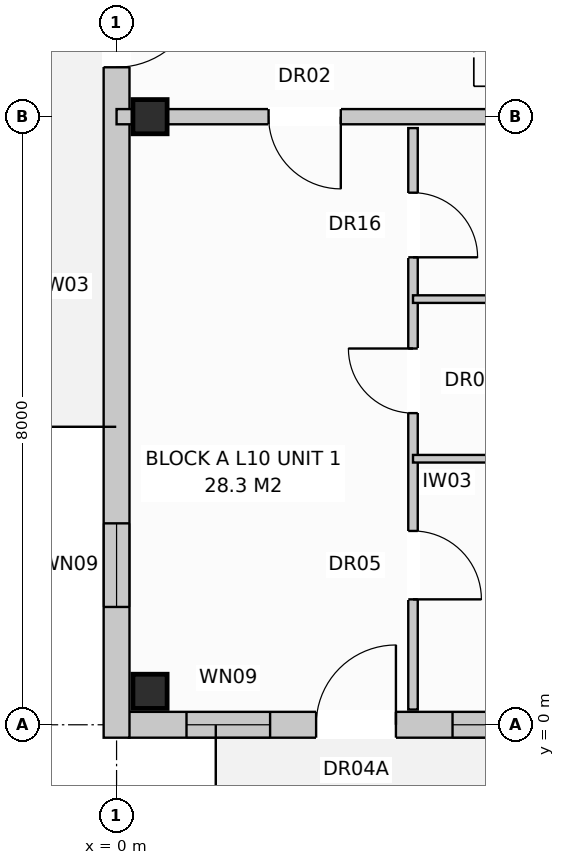
"""IFC4 building model, lengths in metres.
Left out: names, types, materials, properties, quantities, classifications, styles, units other than length and angle.
Written with IfcOpenShell. Run it as: python <this file> out.ifc"""

import sys

from ifc_helpers import new_model, si_unit, direction, frame, frame_2d, origin, origin_with_axes, origin_2d, place, context, subcontext, project, spatial, rectangle, extrude, element, fill, save


model = new_model("IFC4")
c1 = context("Model", 3, precision=1e-05, world=origin(), true_north=direction((0.0, 1.0)))
c2 = subcontext(c1, "Body", "Model", "MODEL_VIEW")
j1 = project(units=[si_unit("LENGTHUNIT", "METRE"), si_unit("PLANEANGLEUNIT", "RADIAN")], contexts=[c1])
p1 = place(None, origin())
s1 = spatial("IfcSite", under=j1, at=p1, CompositionType="ELEMENT")
p2 = place(p1, origin())
s2 = spatial("IfcBuilding", under=s1, at=p2, CompositionType="ELEMENT")
p3 = place(p2, frame((0.0, 0.0, 33.6)))
s3 = spatial("IfcBuildingStorey", under=s2, at=p3, CompositionType="ELEMENT", Elevation=33.6)
for number, where, z_axis, x_axis in (
    (1, (0.44, 0.44, 0.0), (0.0, 0.0, 1.0), (1.0, 0.0, 0.0)),
    (2, (0.44, 8.0, 0.0), (0.0, 0.0, 1.0), (1.0, 0.0, 0.0)),
):
    element("IfcColumn", number, at=place(p3, frame(where, z_axis=z_axis, x_axis=x_axis)), inside=s3, PredefinedType="COLUMN", context=c2, shape_type="SweptSolid", body=[
        extrude(rectangle(XDim=0.45, YDim=0.45, at=origin_2d()), origin(), (0.0, 0.0, 1.0), 3.2),
    ])
p4 = place(p3, frame((0.16, 0.0, 0.0), z_axis=(0.0, 0.0, 1.0), x_axis=(1.0, 0.0, 0.0)))
e3 = element("IfcWall", 3, at=p4, inside=s3, PredefinedType="STANDARD", context=c2, shape_type="SweptSolid", body=[
    extrude(rectangle(XDim=41.08, YDim=0.34, at=frame_2d((20.54, 0.0))), origin(), (0.0, 0.0, 1.0), 2.96),
])
p5 = place(p4, frame((2.465, 0.0, 0.0)))
e4 = element("IfcOpeningElement", 4, at=p5, cuts=e3, PredefinedType="OPENING", context=c2, shape_type="SweptSolid", body=[
    extrude(rectangle(XDim=1.05, YDim=2.12, at=frame_2d((0.525, 1.06))), frame((0.0, 0.182, 0.0), z_axis=(0.0, -1.0, 0.0), x_axis=(1.0, 0.0, 0.0)), (0.0, 0.0, 1.0), 0.364),
])
p6 = place(p4, frame((18.86, 0.0, 0.0)))
e5 = element("IfcOpeningElement", 5, at=p6, cuts=e3, PredefinedType="OPENING", context=c2, shape_type="SweptSolid", body=[
    extrude(rectangle(XDim=1.05, YDim=2.12, at=frame_2d((0.525, 1.06))), frame((0.0, 0.182, 0.0), z_axis=(0.0, -1.0, 0.0), x_axis=(1.0, 0.0, 0.0)), (0.0, 0.0, 1.0), 0.364),
])
p7 = place(p4, frame((32.66, 0.0, 0.0)))
e6 = element("IfcOpeningElement", 6, at=p7, cuts=e3, PredefinedType="OPENING", context=c2, shape_type="SweptSolid", body=[
    extrude(rectangle(XDim=1.05, YDim=2.12, at=frame_2d((0.525, 1.06))), frame((0.0, 0.182, 0.0), z_axis=(0.0, -1.0, 0.0), x_axis=(1.0, 0.0, 0.0)), (0.0, 0.0, 1.0), 0.364),
])
p8 = place(p4, frame((0.76, 0.0, 0.72)))
e7 = element("IfcOpeningElement", 7, at=p8, cuts=e3, PredefinedType="OPENING", context=c2, shape_type="SweptSolid", body=[
    extrude(rectangle(XDim=1.1, YDim=1.5, at=frame_2d((0.55, 0.75))), frame((0.0, 0.182, 0.0), z_axis=(0.0, -1.0, 0.0), x_axis=(1.0, 0.0, 0.0)), (0.0, 0.0, 1.0), 0.364),
])
p9 = place(p4, frame((4.26, 0.0, 0.72)))
e8 = element("IfcOpeningElement", 8, at=p9, cuts=e3, PredefinedType="OPENING", context=c2, shape_type="SweptSolid", body=[
    extrude(rectangle(XDim=1.9, YDim=1.85, at=frame_2d((0.95, 0.925))), frame((0.0, 0.182, 0.0), z_axis=(0.0, -1.0, 0.0), x_axis=(1.0, 0.0, 0.0)), (0.0, 0.0, 1.0), 0.364),
])
p10 = place(p4, frame((7.935, 0.0, 0.8)))
e9 = element("IfcOpeningElement", 9, at=p10, cuts=e3, PredefinedType="OPENING", context=c2, shape_type="SweptSolid", body=[
    extrude(rectangle(XDim=1.95, YDim=1.65, at=frame_2d((0.975, 0.825))), frame((0.0, 0.182, 0.0), z_axis=(0.0, -1.0, 0.0), x_axis=(1.0, 0.0, 0.0)), (0.0, 0.0, 1.0), 0.364),
])
p11 = place(p4, frame((11.66, 0.0, 0.72)))
e10 = element("IfcOpeningElement", 10, at=p11, cuts=e3, PredefinedType="OPENING", context=c2, shape_type="SweptSolid", body=[
    extrude(rectangle(XDim=1.1, YDim=1.5, at=frame_2d((0.55, 0.75))), frame((0.0, 0.182, 0.0), z_axis=(0.0, -1.0, 0.0), x_axis=(1.0, 0.0, 0.0)), (0.0, 0.0, 1.0), 0.364),
])
p12 = place(p4, frame((16.735, 0.0, 0.8)))
e11 = element("IfcOpeningElement", 11, at=p12, cuts=e3, PredefinedType="OPENING", context=c2, shape_type="SweptSolid", body=[
    extrude(rectangle(XDim=1.9, YDim=1.85, at=frame_2d((0.95, 0.925))), frame((0.0, 0.182, 0.0), z_axis=(0.0, -1.0, 0.0), x_axis=(1.0, 0.0, 0.0)), (0.0, 0.0, 1.0), 0.364),
])
p13 = place(p4, frame((22.235, 0.0, 0.8)))
e12 = element("IfcOpeningElement", 12, at=p13, cuts=e3, PredefinedType="OPENING", context=c2, shape_type="SweptSolid", body=[
    extrude(rectangle(XDim=1.95, YDim=1.65, at=frame_2d((0.975, 0.825))), frame((0.0, 0.182, 0.0), z_axis=(0.0, -1.0, 0.0), x_axis=(1.0, 0.0, 0.0)), (0.0, 0.0, 1.0), 0.364),
])
p14 = place(p4, frame((28.36, 0.0, 0.72)))
e13 = element("IfcOpeningElement", 13, at=p14, cuts=e3, PredefinedType="OPENING", context=c2, shape_type="SweptSolid", body=[
    extrude(rectangle(XDim=1.1, YDim=1.5, at=frame_2d((0.55, 0.75))), frame((0.0, 0.182, 0.0), z_axis=(0.0, -1.0, 0.0), x_axis=(1.0, 0.0, 0.0)), (0.0, 0.0, 1.0), 0.364),
])
p15 = place(p4, frame((30.46, 0.0, 0.8)))
e14 = element("IfcOpeningElement", 14, at=p15, cuts=e3, PredefinedType="OPENING", context=c2, shape_type="SweptSolid", body=[
    extrude(rectangle(XDim=1.9, YDim=1.85, at=frame_2d((0.95, 0.925))), frame((0.0, 0.182, 0.0), z_axis=(0.0, -1.0, 0.0), x_axis=(1.0, 0.0, 0.0)), (0.0, 0.0, 1.0), 0.364),
])
p16 = place(p4, frame((35.535, 0.0, 0.8)))
e15 = element("IfcOpeningElement", 15, at=p16, cuts=e3, PredefinedType="OPENING", context=c2, shape_type="SweptSolid", body=[
    extrude(rectangle(XDim=1.95, YDim=1.65, at=frame_2d((0.975, 0.825))), frame((0.0, 0.182, 0.0), z_axis=(0.0, -1.0, 0.0), x_axis=(1.0, 0.0, 0.0)), (0.0, 0.0, 1.0), 0.364),
])
p17 = place(p4, frame((39.26, 0.0, 0.72)))
e16 = element("IfcOpeningElement", 16, at=p17, cuts=e3, PredefinedType="OPENING", context=c2, shape_type="SweptSolid", body=[
    extrude(rectangle(XDim=1.1, YDim=1.5, at=frame_2d((0.55, 0.75))), frame((0.0, 0.182, 0.0), z_axis=(0.0, -1.0, 0.0), x_axis=(1.0, 0.0, 0.0)), (0.0, 0.0, 1.0), 0.364),
])
p18 = place(p3, frame((0.0, -0.17, 0.0), z_axis=(0.0, 0.0, 1.0), x_axis=(0.0, 1.0, 0.0)))
e17 = element("IfcWall", 17, at=p18, inside=s3, PredefinedType="STANDARD", context=c2, shape_type="SweptSolid", body=[
    extrude(rectangle(XDim=18.74, YDim=0.34, at=frame_2d((9.37, 0.0))), origin(), (0.0, 0.0, 1.0), 2.96),
])
p19 = place(p18, frame((8.82, 0.0, 0.0)))
e18 = element("IfcOpeningElement", 18, at=p19, cuts=e17, PredefinedType="OPENING", context=c2, shape_type="SweptSolid", body=[
    extrude(rectangle(XDim=1.1, YDim=2.1, at=frame_2d((0.55, 1.05))), frame((0.0, 0.182, 0.0), z_axis=(0.0, -1.0, 0.0), x_axis=(1.0, 0.0, 0.0)), (0.0, 0.0, 1.0), 0.364),
])
p20 = place(p18, frame((1.72, 0.0, 0.72)))
e19 = element("IfcOpeningElement", 19, at=p20, cuts=e17, PredefinedType="OPENING", context=c2, shape_type="SweptSolid", body=[
    extrude(rectangle(XDim=1.1, YDim=1.5, at=frame_2d((0.55, 0.75))), frame((0.0, 0.182, 0.0), z_axis=(0.0, -1.0, 0.0), x_axis=(1.0, 0.0, 0.0)), (0.0, 0.0, 1.0), 0.364),
])
p21 = place(p18, frame((15.92, 0.0, 0.72)))
e20 = element("IfcOpeningElement", 20, at=p21, cuts=e17, PredefinedType="OPENING", context=c2, shape_type="SweptSolid", body=[
    extrude(rectangle(XDim=1.1, YDim=1.5, at=frame_2d((0.55, 0.75))), frame((0.0, 0.182, 0.0), z_axis=(0.0, -1.0, 0.0), x_axis=(1.0, 0.0, 0.0)), (0.0, 0.0, 1.0), 0.364),
])
p22 = place(p3, frame((0.0, 8.0, 0.0), z_axis=(0.0, 0.0, 1.0), x_axis=(1.0, 0.0, 0.0)))
e21 = element("IfcWall", 21, at=p22, inside=s3, PredefinedType="PARTITIONING", context=c2, shape_type="SweptSolid", body=[
    extrude(rectangle(XDim=6.9, YDim=0.2, at=frame_2d((3.45, 0.0))), origin(), (0.0, 0.0, 1.0), 2.4),
])
p23 = place(p22, frame((2.0, 0.0, 0.0)))
e22 = element("IfcOpeningElement", 22, at=p23, cuts=e21, PredefinedType="OPENING", context=c2, shape_type="SweptSolid", body=[
    extrude(rectangle(XDim=0.95, YDim=2.15, at=frame_2d((0.475, 1.075))), frame((0.0, 0.112, 0.0), z_axis=(0.0, -1.0, 0.0), x_axis=(1.0, 0.0, 0.0)), (0.0, 0.0, 1.0), 0.224),
])
p24 = place(p3, frame((3.9, 7.85, 0.0), z_axis=(0.0, 0.0, 1.0), x_axis=(0.0, -1.0, 0.0)))
e23 = element("IfcWall", 23, at=p24, inside=s3, PredefinedType="PARTITIONING", context=c2, shape_type="SweptSolid", body=[
    extrude(rectangle(XDim=7.65, YDim=0.125, at=frame_2d((3.825, 0.0))), origin(), (0.0, 0.0, 1.0), 2.96),
])
p25 = place(p24, frame((0.85, 0.0, 0.0)))
e24 = element("IfcOpeningElement", 24, at=p25, cuts=e23, PredefinedType="OPENING", context=c2, shape_type="SweptSolid", body=[
    extrude(rectangle(XDim=0.85, YDim=2.1, at=frame_2d((0.425, 1.05))), frame((0.0, 0.074, 0.0), z_axis=(0.0, -1.0, 0.0), x_axis=(1.0, 0.0, 0.0)), (0.0, 0.0, 1.0), 0.149),
])
p26 = place(p24, frame((2.9, 0.0, 0.0)))
e25 = element("IfcOpeningElement", 25, at=p26, cuts=e23, PredefinedType="OPENING", context=c2, shape_type="SweptSolid", body=[
    extrude(rectangle(XDim=0.85, YDim=2.05, at=frame_2d((0.425, 1.025))), frame((0.0, 0.074, 0.0), z_axis=(0.0, -1.0, 0.0), x_axis=(1.0, 0.0, 0.0)), (0.0, 0.0, 1.0), 0.149),
])
p27 = place(p24, frame((5.3, 0.0, 0.0)))
e26 = element("IfcOpeningElement", 26, at=p27, cuts=e23, PredefinedType="OPENING", context=c2, shape_type="SweptSolid", body=[
    extrude(rectangle(XDim=0.9, YDim=2.1, at=frame_2d((0.45, 1.05))), frame((0.0, 0.074, 0.0), z_axis=(0.0, -1.0, 0.0), x_axis=(1.0, 0.0, 0.0)), (0.0, 0.0, 1.0), 0.149),
])
for number, where, z_axis, x_axis in (
    (27, (3.9, 5.6, 0.0), (0.0, 0.0, 1.0), (1.0, 0.0, 0.0)),
    (28, (3.9, 3.5, 0.0), (0.0, 0.0, 1.0), (1.0, 0.0, 0.0)),
):
    element("IfcWall", number, at=place(p3, frame(where, z_axis=z_axis, x_axis=x_axis)), inside=s3, PredefinedType="PARTITIONING", context=c2, shape_type="SweptSolid", body=[
        extrude(rectangle(XDim=2.9, YDim=0.1, at=frame_2d((1.45, 0.0))), origin(), (0.0, 0.0, 1.0), 2.96),
    ])
p28 = place(p5, origin_with_axes())
e29 = element("IfcDoor", 29, at=p28, inside=s3, OperationType="SINGLE_SWING_RIGHT", PredefinedType="DOOR", context=c2, shape_type="SweptSolid", body=[
    extrude(rectangle(XDim=1.05, YDim=2.12, at=frame_2d((0.525, 1.06))), frame((0.0, 0.025, 0.0), z_axis=(0.0, -1.0, 0.0), x_axis=(1.0, 0.0, 0.0)), (0.0, 0.0, 1.0), 0.05),
])
fill(e4, e29)
p29 = place(p8, origin_with_axes())
e30 = element("IfcWindow", 30, at=p29, inside=s3, PartitioningType="SINGLE_PANEL", PredefinedType="WINDOW", context=c2, shape_type="SweptSolid", body=[
    extrude(rectangle(XDim=1.1, YDim=1.5, at=frame_2d((0.55, 0.75))), frame((0.0, 0.03, 0.0), z_axis=(0.0, -1.0, 0.0), x_axis=(1.0, 0.0, 0.0)), (0.0, 0.0, 1.0), 0.06),
])
fill(e7, e30)
p30 = place(p9, origin_with_axes())
e31 = element("IfcWindow", 31, at=p30, inside=s3, PartitioningType="SINGLE_PANEL", PredefinedType="WINDOW", context=c2, shape_type="SweptSolid", body=[
    extrude(rectangle(XDim=1.9, YDim=1.85, at=frame_2d((0.95, 0.925))), frame((0.0, 0.03, 0.0), z_axis=(0.0, -1.0, 0.0), x_axis=(1.0, 0.0, 0.0)), (0.0, 0.0, 1.0), 0.06),
])
fill(e8, e31)
p31 = place(p19, frame((1.1, 0.0, 0.0), z_axis=(0.0, 0.0, 1.0), x_axis=(-1.0, 0.0, 0.0)))
e32 = element("IfcDoor", 32, at=p31, inside=s3, OperationType="SINGLE_SWING_RIGHT", PredefinedType="DOOR", context=c2, shape_type="SweptSolid", body=[
    extrude(rectangle(XDim=1.1, YDim=2.1, at=frame_2d((0.55, 1.05))), frame((0.0, 0.025, 0.0), z_axis=(0.0, -1.0, 0.0), x_axis=(1.0, 0.0, 0.0)), (0.0, 0.0, 1.0), 0.05),
])
fill(e18, e32)
p32 = place(p20, origin_with_axes())
e33 = element("IfcWindow", 33, at=p32, inside=s3, PartitioningType="SINGLE_PANEL", PredefinedType="WINDOW", context=c2, shape_type="SweptSolid", body=[
    extrude(rectangle(XDim=1.1, YDim=1.5, at=frame_2d((0.55, 0.75))), frame((0.0, 0.03, 0.0), z_axis=(0.0, -1.0, 0.0), x_axis=(1.0, 0.0, 0.0)), (0.0, 0.0, 1.0), 0.06),
])
fill(e19, e33)
p33 = place(p23, frame((0.95, 0.0, 0.0), z_axis=(0.0, 0.0, 1.0), x_axis=(-1.0, 0.0, 0.0)))
e34 = element("IfcDoor", 34, at=p33, inside=s3, OperationType="SINGLE_SWING_RIGHT", PredefinedType="DOOR", context=c2, shape_type="SweptSolid", body=[
    extrude(rectangle(XDim=0.95, YDim=2.15, at=frame_2d((0.475, 1.075))), frame((0.0, 0.025, 0.0), z_axis=(0.0, -1.0, 0.0), x_axis=(1.0, 0.0, 0.0)), (0.0, 0.0, 1.0), 0.05),
])
fill(e22, e34)
p34 = place(p25, origin_with_axes())
e35 = element("IfcDoor", 35, at=p34, inside=s3, OperationType="SINGLE_SWING_RIGHT", PredefinedType="DOOR", context=c2, shape_type="SweptSolid", body=[
    extrude(rectangle(XDim=0.85, YDim=2.1, at=frame_2d((0.425, 1.05))), frame((0.0, 0.025, 0.0), z_axis=(0.0, -1.0, 0.0), x_axis=(1.0, 0.0, 0.0)), (0.0, 0.0, 1.0), 0.05),
])
fill(e24, e35)
p35 = place(p26, frame((0.85, 0.0, 0.0), z_axis=(0.0, 0.0, 1.0), x_axis=(-1.0, 0.0, 0.0)))
e36 = element("IfcDoor", 36, at=p35, inside=s3, OperationType="SINGLE_SWING_LEFT", PredefinedType="DOOR", context=c2, shape_type="SweptSolid", body=[
    extrude(rectangle(XDim=0.85, YDim=2.05, at=frame_2d((0.425, 1.025))), frame((0.0, 0.025, 0.0), z_axis=(0.0, -1.0, 0.0), x_axis=(1.0, 0.0, 0.0)), (0.0, 0.0, 1.0), 0.05),
])
fill(e25, e36)
p36 = place(p27, origin_with_axes())
e37 = element("IfcDoor", 37, at=p36, inside=s3, OperationType="SINGLE_SWING_RIGHT", PredefinedType="DOOR", context=c2, shape_type="SweptSolid", body=[
    extrude(rectangle(XDim=0.9, YDim=2.1, at=frame_2d((0.45, 1.05))), frame((0.0, 0.025, 0.0), z_axis=(0.0, -1.0, 0.0), x_axis=(1.0, 0.0, 0.0)), (0.0, 0.0, 1.0), 0.05),
])
fill(e26, e37)
save(model, sys.argv[1])
